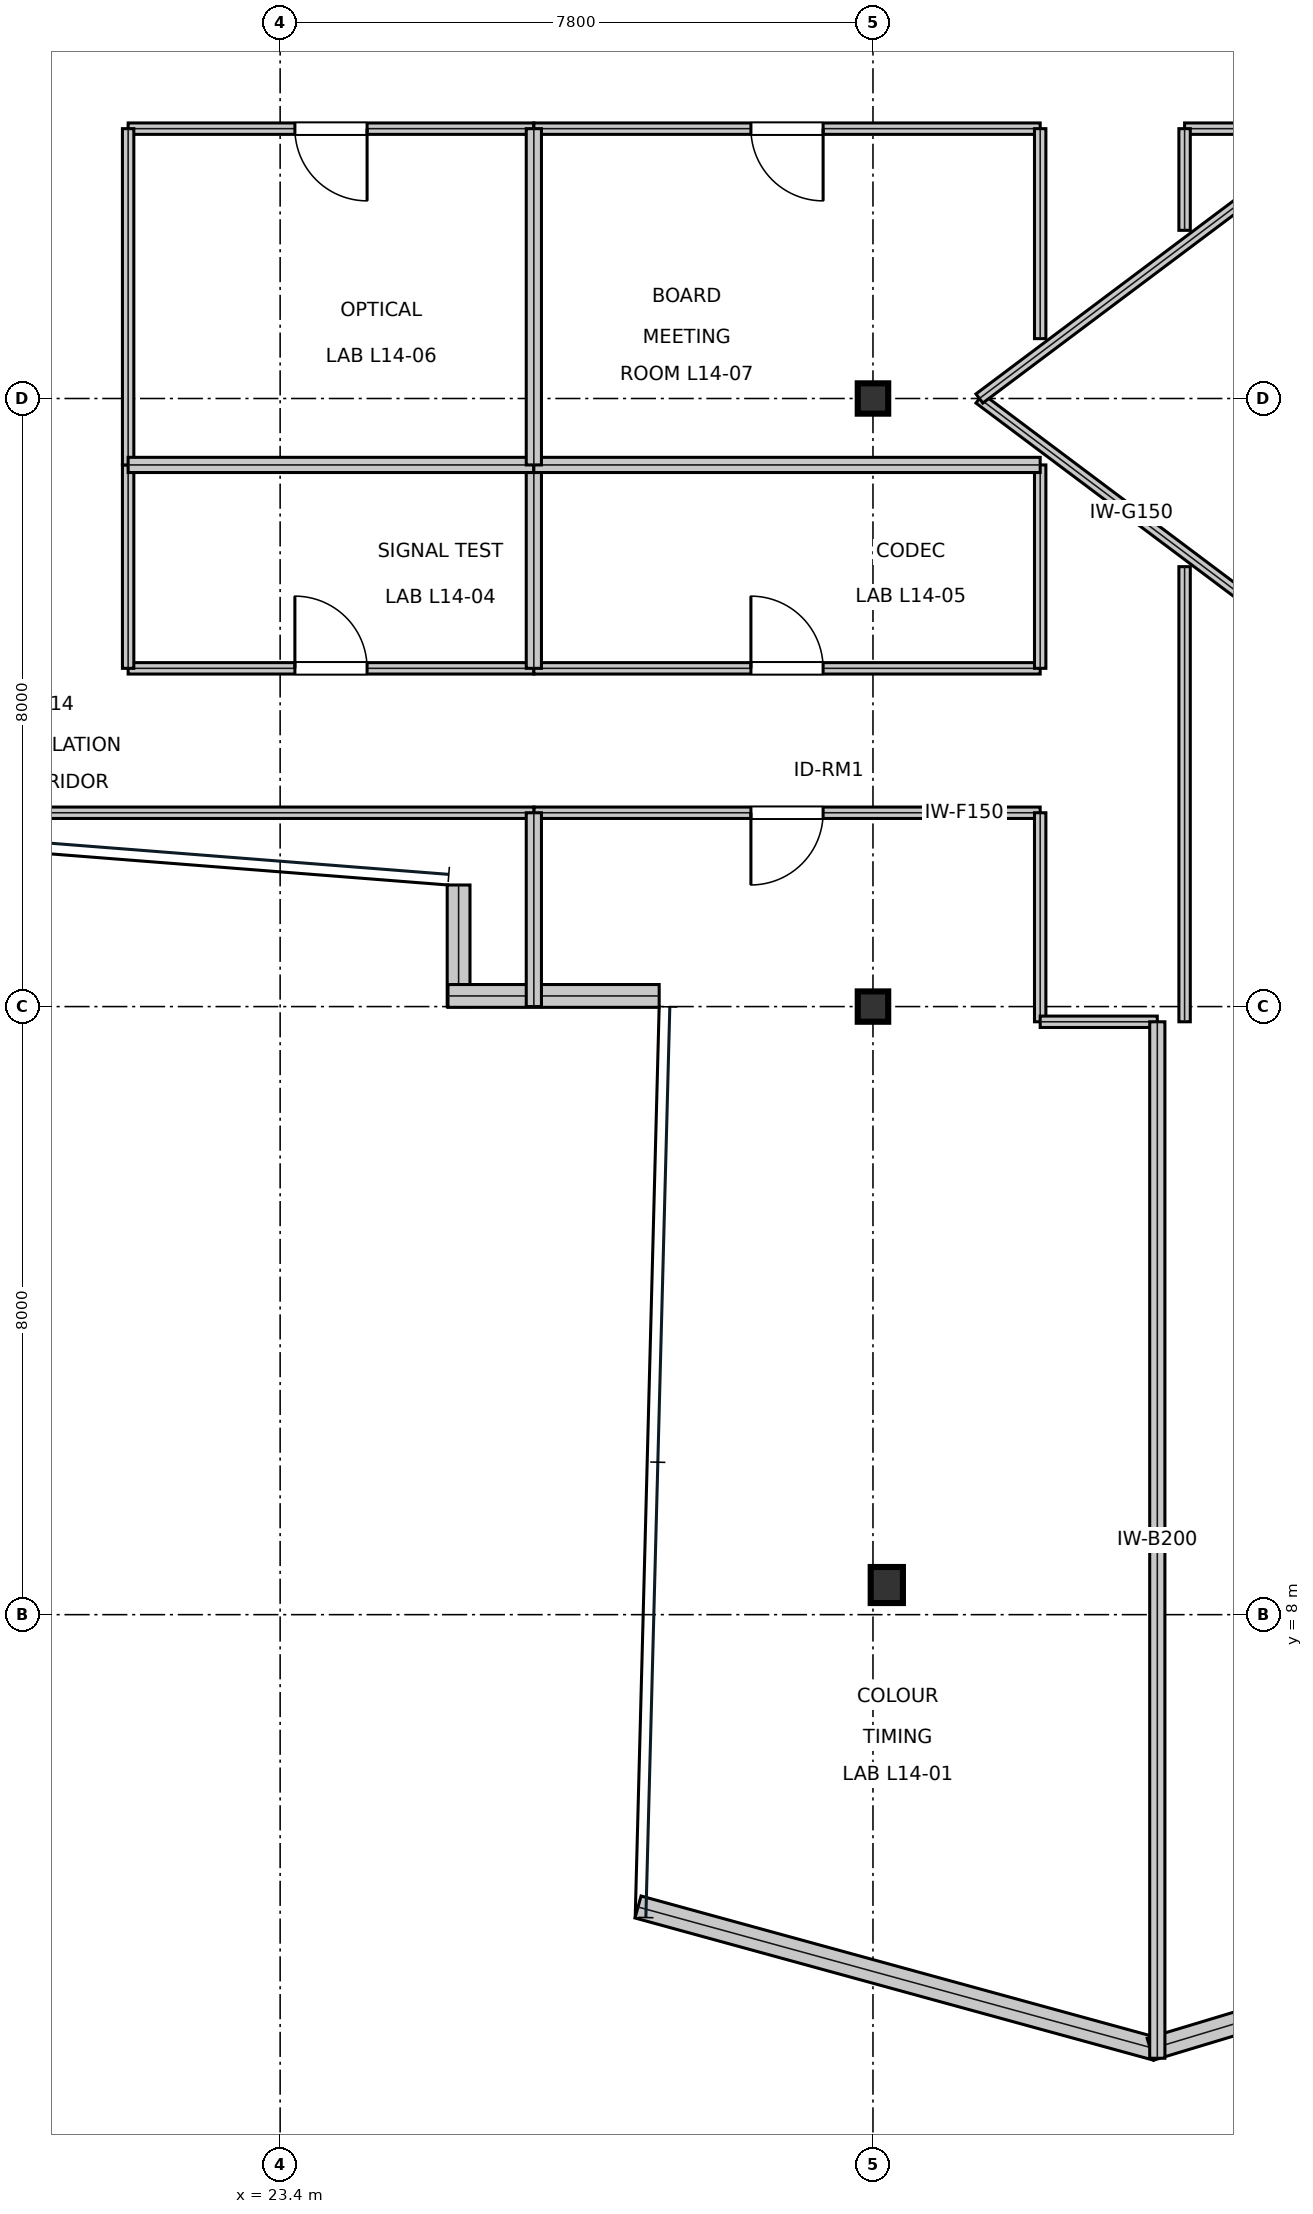
"""IFC4 building model, lengths in metres.
Left out: names, types, materials, properties, quantities, classifications, styles, units other than length and angle.
Written with IfcOpenShell. Run it as: python <this file> out.ifc"""

import sys

from ifc_helpers import new_model, si_unit, direction, frame, frame_2d, origin, origin_2d, place, context, subcontext, project, spatial, rectangle, i_section, extrude, element, fill, save


model = new_model("IFC4")
c1 = context("Model", 3, precision=1e-05, world=origin(), true_north=direction((0.0, 1.0)))
c2 = subcontext(c1, "Body", "Model", "MODEL_VIEW")
j1 = project(units=[si_unit("LENGTHUNIT", "METRE"), si_unit("PLANEANGLEUNIT", "RADIAN")], contexts=[c1])
p1 = place(None, origin())
s1 = spatial("IfcSite", under=j1, at=p1, CompositionType="ELEMENT")
p2 = place(p1, origin())
s2 = spatial("IfcBuilding", under=s1, at=p2, CompositionType="ELEMENT")
p3 = place(p2, frame((0.0, 0.0, 66.15)))
s3 = spatial("IfcBuildingStorey", under=s2, at=p3, CompositionType="ELEMENT", Elevation=66.15)
for number, where, z_axis, x_axis in (
    (1, (31.2, 16.0, 0.0), (0.0, 0.0, 1.0), (1.0, 0.0, 0.0)),
    (2, (31.2, 24.0, 0.0), (0.0, 0.0, 1.0), (1.0, 0.0, 0.0)),
):
    element("IfcColumn", number, at=place(p3, frame(where, z_axis=z_axis, x_axis=x_axis)), inside=s3, PredefinedType="COLUMN", context=c2, shape_type="SweptSolid", body=[
        extrude(i_section(OverallWidth=0.401, OverallDepth=0.399, WebThickness=0.025, FlangeThickness=0.04, at=origin_2d()), origin(), (0.0, 0.0, 1.0), 4.044),
    ])
p4 = place(p3, frame((31.382, 8.39, 0.016), z_axis=(0.0, 0.0, 1.0), x_axis=(1.0, 0.0, 0.0)))
e3 = element("IfcColumn", 3, at=p4, inside=s3, PredefinedType="COLUMN", context=c2, shape_type="SweptSolid", body=[
    extrude(i_section(OverallWidth=0.424, OverallDepth=0.474, WebThickness=0.048, FlangeThickness=0.077, at=origin_2d()), origin(), (0.0, 0.0, 1.0), 4.018),
])
p5 = place(p3, frame((25.748, 17.6, 0.0), z_axis=(0.0, 0.0, 1.0), x_axis=(0.0, -1.0, 0.0)))
e4 = element("IfcWall", 4, at=p5, inside=s3, PredefinedType="STANDARD", context=c2, shape_type="SweptSolid", body=[
    extrude(rectangle(XDim=1.6, YDim=0.3, at=frame_2d((0.8, 0.0))), origin(), (0.0, 0.0, 1.0), 3.338),
])
p6 = place(p3, frame((25.608, 16.14, 0.0), z_axis=(0.0, 0.0, 1.0), x_axis=(1.0, 0.0, 0.0)))
e5 = element("IfcWall", 5, at=p6, inside=s3, PredefinedType="STANDARD", context=c2, shape_type="SweptSolid", body=[
    extrude(rectangle(XDim=2.779, YDim=0.3, at=frame_2d((1.39, 0.0))), origin(), (0.0, 0.0, 1.0), 3.81),
])
p7 = place(p3, frame((28.109, 4.154, 0.0), z_axis=(0.0, 0.0, 1.0), x_axis=(0.96439075506, -0.264481514581, 0.0)))
e6 = element("IfcWall", 6, at=p7, inside=s3, PredefinedType="STANDARD", context=c2, shape_type="SweptSolid", body=[
    extrude(rectangle(XDim=7.071, YDim=0.3, at=frame_2d((3.535, 0.0))), origin(), (0.0, 0.0, 1.0), 3.81),
])
p8 = place(p3, frame((34.851, 2.283, 0.0), z_axis=(0.0, 0.0, 1.0), x_axis=(0.957387451844, 0.288806625707, 0.0)))
e7 = element("IfcWall", 7, at=p8, inside=s3, PredefinedType="STANDARD", context=c2, shape_type="SweptSolid", body=[
    extrude(rectangle(XDim=7.123, YDim=0.3, at=frame_2d((3.562, 0.0))), origin(), (0.0, 0.0, 1.0), 3.81),
])
p9 = place(p3, frame((26.738, 18.55, 0.0), z_axis=(0.0, 0.0, 1.0), x_axis=(1.0, 0.0, 0.0)))
e8 = element("IfcWall", 8, at=p9, inside=s3, PredefinedType="PARTITIONING", context=c2, shape_type="SweptSolid", body=[
    extrude(rectangle(XDim=6.662, YDim=0.15, at=frame_2d((3.331, 0.0))), origin(), (0.0, 0.0, 1.0), 3.181),
])
p10 = place(p9, frame((2.856, 0.0, 0.0)))
e9 = element("IfcOpeningElement", 9, at=p10, cuts=e8, PredefinedType="OPENING", context=c2, shape_type="SweptSolid", body=[
    extrude(rectangle(XDim=0.95, YDim=2.15, at=frame_2d((0.475, 1.075))), frame((0.0, 0.085, 0.0), z_axis=(0.0, -1.0, 0.0), x_axis=(1.0, 0.0, 0.0)), (0.0, 0.0, 1.0), 0.17),
])
p11 = place(p3, frame((21.4, 20.45, 0.0), z_axis=(0.0, 0.0, 1.0), x_axis=(1.0, 0.0, 0.0)))
e10 = element("IfcWall", 10, at=p11, inside=s3, PredefinedType="PARTITIONING", context=c2, shape_type="SweptSolid", body=[
    extrude(rectangle(XDim=5.338, YDim=0.15, at=frame_2d((2.669, 0.0))), origin(), (0.0, 0.0, 1.0), 3.391),
])
p12 = place(p11, frame((2.194, 0.0, 0.0)))
e11 = element("IfcOpeningElement", 11, at=p12, cuts=e10, PredefinedType="OPENING", context=c2, shape_type="SweptSolid", body=[
    extrude(rectangle(XDim=0.95, YDim=2.15, at=frame_2d((0.475, 1.075))), frame((0.0, 0.085, 0.0), z_axis=(0.0, -1.0, 0.0), x_axis=(1.0, 0.0, 0.0)), (0.0, 0.0, 1.0), 0.17),
])
p13 = place(p3, frame((26.738, 20.45, 0.0), z_axis=(0.0, 0.0, 1.0), x_axis=(1.0, 0.0, 0.0)))
e12 = element("IfcWall", 12, at=p13, inside=s3, PredefinedType="PARTITIONING", context=c2, shape_type="SweptSolid", body=[
    extrude(rectangle(XDim=6.662, YDim=0.15, at=frame_2d((3.331, 0.0))), origin(), (0.0, 0.0, 1.0), 3.181),
])
p14 = place(p13, frame((2.856, 0.0, 0.0)))
e13 = element("IfcOpeningElement", 13, at=p14, cuts=e12, PredefinedType="OPENING", context=c2, shape_type="SweptSolid", body=[
    extrude(rectangle(XDim=0.95, YDim=2.15, at=frame_2d((0.475, 1.075))), frame((0.0, 0.085, 0.0), z_axis=(0.0, -1.0, 0.0), x_axis=(1.0, 0.0, 0.0)), (0.0, 0.0, 1.0), 0.17),
])
p15 = place(p3, frame((21.4, 27.55, 0.0), z_axis=(0.0, 0.0, 1.0), x_axis=(1.0, 0.0, 0.0)))
e14 = element("IfcWall", 14, at=p15, inside=s3, PredefinedType="PARTITIONING", context=c2, shape_type="SweptSolid", body=[
    extrude(rectangle(XDim=5.338, YDim=0.15, at=frame_2d((2.669, 0.0))), origin(), (0.0, 0.0, 1.0), 3.391),
])
p16 = place(p15, frame((2.194, 0.0, 0.0)))
e15 = element("IfcOpeningElement", 15, at=p16, cuts=e14, PredefinedType="OPENING", context=c2, shape_type="SweptSolid", body=[
    extrude(rectangle(XDim=0.95, YDim=2.15, at=frame_2d((0.475, 1.075))), frame((0.0, 0.085, 0.0), z_axis=(0.0, -1.0, 0.0), x_axis=(1.0, 0.0, 0.0)), (0.0, 0.0, 1.0), 0.17),
])
p17 = place(p3, frame((26.738, 27.55, 0.0), z_axis=(0.0, 0.0, 1.0), x_axis=(1.0, 0.0, 0.0)))
e16 = element("IfcWall", 16, at=p17, inside=s3, PredefinedType="PARTITIONING", context=c2, shape_type="SweptSolid", body=[
    extrude(rectangle(XDim=6.662, YDim=0.15, at=frame_2d((3.331, 0.0))), origin(), (0.0, 0.0, 1.0), 3.181),
])
p18 = place(p17, frame((2.856, 0.0, 0.0)))
e17 = element("IfcOpeningElement", 17, at=p18, cuts=e16, PredefinedType="OPENING", context=c2, shape_type="SweptSolid", body=[
    extrude(rectangle(XDim=0.95, YDim=2.15, at=frame_2d((0.475, 1.075))), frame((0.0, 0.085, 0.0), z_axis=(0.0, -1.0, 0.0), x_axis=(1.0, 0.0, 0.0)), (0.0, 0.0, 1.0), 0.17),
])
p19 = place(p3, frame((33.4, 15.8, 0.0), z_axis=(0.0, 0.0, 1.0), x_axis=(0.0, 1.0, 0.0)))
e18 = element("IfcWall", 18, at=p19, inside=s3, PredefinedType="PARTITIONING", context=c2, shape_type="SweptSolid", body=[
    extrude(rectangle(XDim=2.75, YDim=0.15, at=frame_2d((1.375, 0.0))), origin(), (0.0, 0.0, 1.0), 3.181),
])
p20 = place(p3, frame((33.4, 15.8, 0.0), z_axis=(0.0, 0.0, 1.0), x_axis=(1.0, 0.0, 0.0)))
e19 = element("IfcWall", 19, at=p20, inside=s3, PredefinedType="PARTITIONING", context=c2, shape_type="SweptSolid", body=[
    extrude(rectangle(XDim=1.541, YDim=0.15, at=frame_2d((0.771, 0.0))), origin(), (0.0, 0.0, 1.0), 3.181),
])
p21 = place(p3, frame((35.3, 15.8, 0.0), z_axis=(0.0, 0.0, 1.0), x_axis=(0.0, 1.0, 0.0)))
e20 = element("IfcWall", 20, at=p21, inside=s3, PredefinedType="PARTITIONING", context=c2, shape_type="SweptSolid", body=[
    extrude(rectangle(XDim=5.988, YDim=0.15, at=frame_2d((2.994, 0.0))), origin(), (0.0, 0.0, 1.0), 3.181),
])
p22 = place(p3, frame((35.3, 27.55, 0.0), z_axis=(0.0, 0.0, 1.0), x_axis=(1.0, 0.0, 0.0)))
e21 = element("IfcWall", 21, at=p22, inside=s3, PredefinedType="PARTITIONING", context=c2, shape_type="SweptSolid", body=[
    extrude(rectangle(XDim=1.75, YDim=0.15, at=frame_2d((0.875, 0.0))), origin(), (0.0, 0.0, 1.0), 3.391),
])
p23 = place(p3, frame((35.3, 26.212, 0.0), z_axis=(0.0, 0.0, 1.0), x_axis=(0.0, 1.0, 0.0)))
e22 = element("IfcWall", 22, at=p23, inside=s3, PredefinedType="PARTITIONING", context=c2, shape_type="SweptSolid", body=[
    extrude(rectangle(XDim=1.338, YDim=0.15, at=frame_2d((0.669, 0.0))), origin(), (0.0, 0.0, 1.0), 3.81),
])
p24 = place(p3, frame((13.604, 18.55, 0.0), z_axis=(0.0, 0.0, 1.0), x_axis=(1.0, 0.0, 0.0)))
e23 = element("IfcWall", 23, at=p24, inside=s3, PredefinedType="PARTITIONING", context=c2, shape_type="SweptSolid", body=[
    extrude(rectangle(XDim=13.135, YDim=0.15, at=frame_2d((6.567, 0.0))), origin(), (0.0, 0.0, 1.0), 3.338),
])
p25 = place(p3, frame((21.4, 20.45, 0.0), z_axis=(0.0, 0.0, 1.0), x_axis=(0.0, 1.0, 0.0)))
e24 = element("IfcWall", 24, at=p25, inside=s3, PredefinedType="PARTITIONING", context=c2, shape_type="SweptSolid", body=[
    extrude(rectangle(XDim=2.676, YDim=0.15, at=frame_2d((1.338, 0.0))), origin(), (0.0, 0.0, 1.0), 3.181),
])
p26 = place(p3, frame((33.4, 20.45, 0.0), z_axis=(0.0, 0.0, 1.0), x_axis=(0.0, 1.0, 0.0)))
e25 = element("IfcWall", 25, at=p26, inside=s3, PredefinedType="PARTITIONING", context=c2, shape_type="SweptSolid", body=[
    extrude(rectangle(XDim=2.676, YDim=0.15, at=frame_2d((1.338, 0.0))), origin(), (0.0, 0.0, 1.0), 3.81),
])
p27 = place(p3, frame((21.4, 23.126, 0.0), z_axis=(0.0, 0.0, 1.0), x_axis=(0.0, 1.0, 0.0)))
e26 = element("IfcWall", 26, at=p27, inside=s3, PredefinedType="PARTITIONING", context=c2, shape_type="SweptSolid", body=[
    extrude(rectangle(XDim=4.424, YDim=0.15, at=frame_2d((2.212, 0.0))), origin(), (0.0, 0.0, 1.0), 3.181),
])
p28 = place(p3, frame((33.4, 24.788, 0.0), z_axis=(0.0, 0.0, 1.0), x_axis=(0.0, 1.0, 0.0)))
e27 = element("IfcWall", 27, at=p28, inside=s3, PredefinedType="PARTITIONING", context=c2, shape_type="SweptSolid", body=[
    extrude(rectangle(XDim=2.762, YDim=0.15, at=frame_2d((1.381, 0.0))), origin(), (0.0, 0.0, 1.0), 3.81),
])
p29 = place(p3, frame((34.941, 2.164, 0.0), z_axis=(0.0, 0.0, 1.0), x_axis=(0.0, 1.0, 0.0)))
e28 = element("IfcWall", 28, at=p29, inside=s3, PredefinedType="SOLIDWALL", context=c2, shape_type="SweptSolid", body=[
    extrude(rectangle(XDim=13.636, YDim=0.2, at=frame_2d((6.818, 0.0))), origin(), (0.0, 0.0, 1.0), 3.338),
])
p30 = place(p3, frame((26.738, 16.0, 0.0), z_axis=(0.0, 0.0, 1.0), x_axis=(0.0, 1.0, 0.0)))
e29 = element("IfcWall", 29, at=p30, inside=s3, PredefinedType="SOLIDWALL", context=c2, shape_type="SweptSolid", body=[
    extrude(rectangle(XDim=2.55, YDim=0.2, at=frame_2d((1.275, 0.0))), origin(), (0.0, 0.0, 1.0), 3.338),
])
p31 = place(p3, frame((26.738, 20.45, 0.0), z_axis=(0.0, 0.0, 1.0), x_axis=(0.0, 1.0, 0.0)))
e30 = element("IfcWall", 30, at=p31, inside=s3, PredefinedType="SOLIDWALL", context=c2, shape_type="SweptSolid", body=[
    extrude(rectangle(XDim=2.676, YDim=0.2, at=frame_2d((1.338, 0.0))), origin(), (0.0, 0.0, 1.0), 3.81),
])
p32 = place(p3, frame((21.4, 23.126, 0.0), z_axis=(0.0, 0.0, 1.0), x_axis=(1.0, 0.0, 0.0)))
e31 = element("IfcWall", 31, at=p32, inside=s3, PredefinedType="SOLIDWALL", context=c2, shape_type="SweptSolid", body=[
    extrude(rectangle(XDim=5.338, YDim=0.2, at=frame_2d((2.669, 0.0))), origin(), (0.0, 0.0, 1.0), 3.181),
])
p33 = place(p3, frame((26.738, 23.126, 0.0), z_axis=(0.0, 0.0, 1.0), x_axis=(1.0, 0.0, 0.0)))
e32 = element("IfcWall", 32, at=p33, inside=s3, PredefinedType="SOLIDWALL", context=c2, shape_type="SweptSolid", body=[
    extrude(rectangle(XDim=6.662, YDim=0.2, at=frame_2d((3.331, 0.0))), origin(), (0.0, 0.0, 1.0), 3.181),
])
p34 = place(p3, frame((26.738, 23.126, 0.0), z_axis=(0.0, 0.0, 1.0), x_axis=(0.0, 1.0, 0.0)))
e33 = element("IfcWall", 33, at=p34, inside=s3, PredefinedType="SOLIDWALL", context=c2, shape_type="SweptSolid", body=[
    extrude(rectangle(XDim=4.424, YDim=0.2, at=frame_2d((2.212, 0.0))), origin(), (0.0, 0.0, 1.0), 3.181),
])
for number, where, z_axis, x_axis in (
    (34, (32.6, 24.0, 0.0), (0.0, 0.0, 1.0), (0.8, -0.6, 0.0)),
    (35, (36.6, 27.0, 0.0), (0.0, 0.0, 1.0), (-0.8, -0.6, 0.0)),
):
    element("IfcWall", number, at=place(p3, frame(where, z_axis=z_axis, x_axis=x_axis)), inside=s3, PredefinedType="MOVABLE", context=c2, shape_type="SweptSolid", body=[
        extrude(rectangle(XDim=5.0, YDim=0.15, at=frame_2d((2.5, 0.0))), origin(), (0.0, 0.0, 1.0), 3.81),
    ])
p35 = place(p10, frame((0.95, 0.0, 0.0), z_axis=(0.0, 0.0, 1.0), x_axis=(-1.0, 0.0, 0.0)))
e36 = element("IfcDoor", 36, at=p35, inside=s3, OperationType="SINGLE_SWING_RIGHT", PredefinedType="DOOR", context=c2, shape_type="SweptSolid", body=[
    extrude(rectangle(XDim=0.95, YDim=2.15, at=frame_2d((0.475, 1.075))), frame((0.0, 0.025, 0.0), z_axis=(0.0, -1.0, 0.0), x_axis=(1.0, 0.0, 0.0)), (0.0, 0.0, 1.0), 0.05),
])
fill(e9, e36)
p36 = place(p12, origin())
e37 = element("IfcDoor", 37, at=p36, inside=s3, OperationType="SINGLE_SWING_LEFT", PredefinedType="DOOR", context=c2, shape_type="SweptSolid", body=[
    extrude(rectangle(XDim=0.95, YDim=2.15, at=frame_2d((0.475, 1.075))), frame((0.0, 0.025, 0.0), z_axis=(0.0, -1.0, 0.0), x_axis=(1.0, 0.0, 0.0)), (0.0, 0.0, 1.0), 0.05),
])
fill(e11, e37)
p37 = place(p14, origin())
e38 = element("IfcDoor", 38, at=p37, inside=s3, OperationType="SINGLE_SWING_LEFT", PredefinedType="DOOR", context=c2, shape_type="SweptSolid", body=[
    extrude(rectangle(XDim=0.95, YDim=2.15, at=frame_2d((0.475, 1.075))), frame((0.0, 0.025, 0.0), z_axis=(0.0, -1.0, 0.0), x_axis=(1.0, 0.0, 0.0)), (0.0, 0.0, 1.0), 0.05),
])
fill(e13, e38)
p38 = place(p16, frame((0.95, 0.0, 0.0), z_axis=(0.0, 0.0, 1.0), x_axis=(-1.0, 0.0, 0.0)))
e39 = element("IfcDoor", 39, at=p38, inside=s3, OperationType="SINGLE_SWING_LEFT", PredefinedType="DOOR", context=c2, shape_type="SweptSolid", body=[
    extrude(rectangle(XDim=0.95, YDim=2.15, at=frame_2d((0.475, 1.075))), frame((0.0, 0.025, 0.0), z_axis=(0.0, -1.0, 0.0), x_axis=(1.0, 0.0, 0.0)), (0.0, 0.0, 1.0), 0.05),
])
fill(e15, e39)
p39 = place(p18, frame((0.95, 0.0, 0.0), z_axis=(0.0, 0.0, 1.0), x_axis=(-1.0, 0.0, 0.0)))
e40 = element("IfcDoor", 40, at=p39, inside=s3, OperationType="SINGLE_SWING_LEFT", PredefinedType="DOOR", context=c2, shape_type="SweptSolid", body=[
    extrude(rectangle(XDim=0.95, YDim=2.15, at=frame_2d((0.475, 1.075))), frame((0.0, 0.025, 0.0), z_axis=(0.0, -1.0, 0.0), x_axis=(1.0, 0.0, 0.0)), (0.0, 0.0, 1.0), 0.05),
])
fill(e17, e40)
save(model, sys.argv[1])
